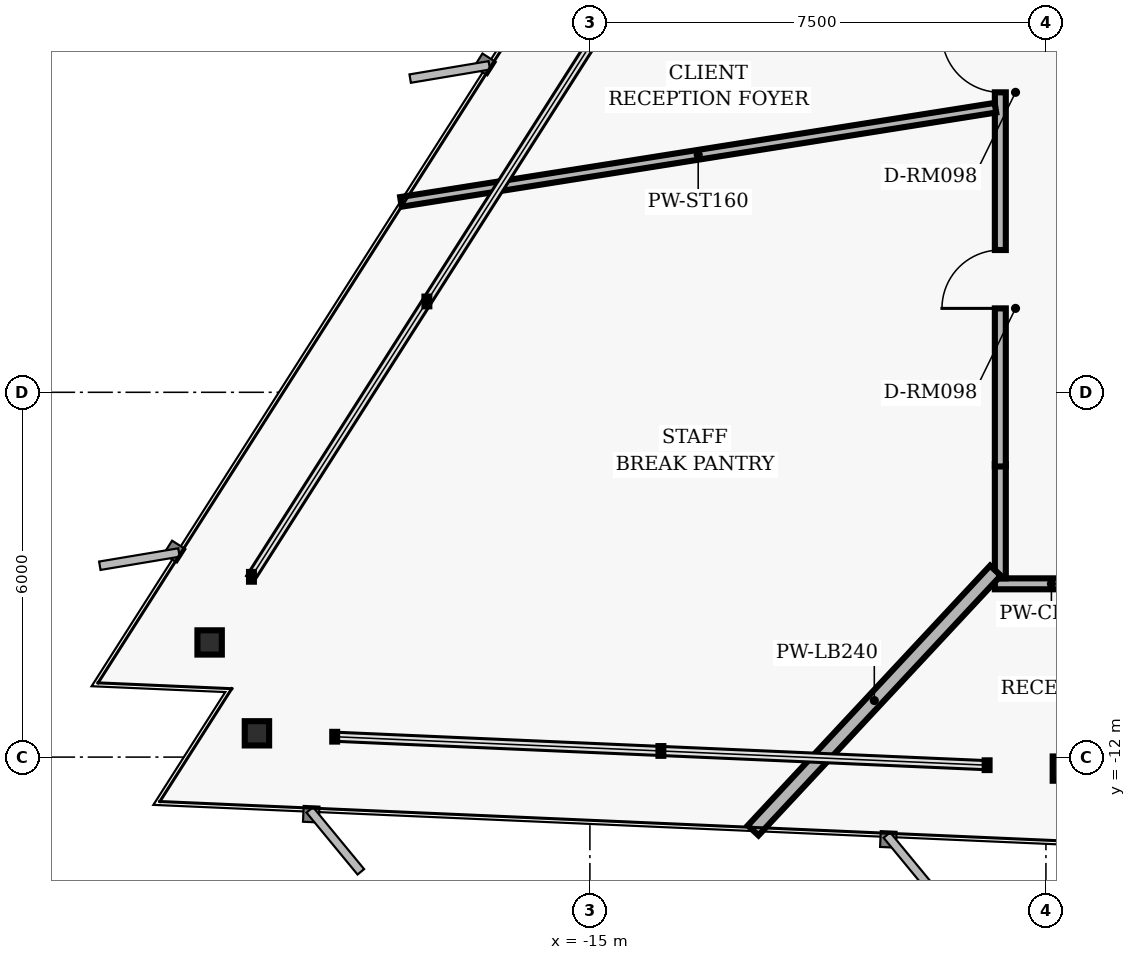
"""IFC4 building model, lengths in metres.
Left out: names, types, materials, properties, quantities, classifications, styles, units other than length and angle.
Written with IfcOpenShell. Run it as: python <this file> out.ifc"""

import sys

from ifc_helpers import new_model, si_unit, direction, frame, frame_2d, origin, origin_2d, place, context, subcontext, project, spatial, rectangle, i_section, extrude, element, fill, save


model = new_model("IFC4")
c1 = context("Model", 3, precision=1e-05, world=origin(), true_north=direction((0.0, 1.0)))
c2 = subcontext(c1, "Body", "Model", "MODEL_VIEW")
j1 = project(units=[si_unit("LENGTHUNIT", "METRE"), si_unit("PLANEANGLEUNIT", "RADIAN")], contexts=[c1])
p1 = place(None, origin())
s1 = spatial("IfcSite", under=j1, at=p1, CompositionType="ELEMENT")
p2 = place(p1, origin())
s2 = spatial("IfcBuilding", under=s1, at=p2, CompositionType="ELEMENT")
p3 = place(p2, frame((0.0, 0.0, 144.16)))
s3 = spatial("IfcBuildingStorey", under=s2, at=p3, CompositionType="ELEMENT", Elevation=144.16)
for number, where, z_axis, x_axis in (
    (1, (-21.254, -10.114, 0.0), (0.0, 0.0, 1.0), (1.0, 0.0, 0.0)),
    (2, (-20.476, -11.609, 0.0), (0.0, 0.0, 1.0), (1.0, 0.0, 0.0)),
    (3, (-7.188, -12.189, 0.0), (0.0, 0.0, 1.0), (1.0, 0.0, 0.0)),
):
    element("IfcColumn", number, at=place(p3, frame(where, z_axis=z_axis, x_axis=x_axis)), inside=s3, PredefinedType="COLUMN", context=c2, shape_type="SweptSolid", body=[
        extrude(i_section(OverallWidth=0.401, OverallDepth=0.399, WebThickness=0.025, FlangeThickness=0.04, FilletRadius=0.018, at=origin_2d()), origin(), (0.0, 0.0, 1.0), 3.04),
    ])
p4 = place(p3, frame((-6.48, -9.15, 0.0), z_axis=(0.0, 0.0, 1.0), x_axis=(-1.0, 0.0, 0.0)))
e4 = element("IfcWall", 4, at=p4, inside=s3, PredefinedType="PARTITIONING", context=c2, shape_type="SweptSolid", body=[
    extrude(rectangle(XDim=1.86, YDim=0.18, at=frame_2d((0.93, 0.0))), origin(), (0.0, 0.0, 1.0), 2.16),
])
p5 = place(p3, frame((-8.25, -9.06, 0.0), z_axis=(0.0, 0.0, 1.0), x_axis=(0.0, 1.0, 0.0)))
e5 = element("IfcWall", 5, at=p5, inside=s3, PredefinedType="PARTITIONING", context=c2, shape_type="SweptSolid", body=[
    extrude(rectangle(XDim=1.88, YDim=0.18, at=frame_2d((0.94, 0.0))), origin(), (0.0, 0.0, 1.0), 2.593),
])
p6 = place(p3, frame((-8.25, -7.22, 0.0), z_axis=(0.0, 0.0, 1.0), x_axis=(0.0, 1.0, 0.0)))
e6 = element("IfcWall", 6, at=p6, inside=s3, PredefinedType="PARTITIONING", context=c2, shape_type="SweptSolid", body=[
    extrude(rectangle(XDim=14.44, YDim=0.18, at=frame_2d((7.22, 0.0))), origin(), (0.0, 0.0, 1.0), 2.593),
])
p7 = place(p6, frame((6.154, 0.0, 0.0)))
e7 = element("IfcOpeningElement", 7, at=p7, cuts=e6, PredefinedType="OPENING", context=c2, shape_type="SweptSolid", body=[
    extrude(rectangle(XDim=0.96, YDim=2.02, at=frame_2d((0.48, 1.01))), frame((0.0, 0.1, 0.0), z_axis=(0.0, -1.0, 0.0), x_axis=(1.0, 0.0, 0.0)), (0.0, 0.0, 1.0), 0.2),
])
p8 = place(p6, frame((2.6, 0.0, 0.0)))
e8 = element("IfcOpeningElement", 8, at=p8, cuts=e6, PredefinedType="OPENING", context=c2, shape_type="SweptSolid", body=[
    extrude(rectangle(XDim=0.96, YDim=2.02, at=frame_2d((0.48, 1.01))), frame((0.0, 0.1, 0.0), z_axis=(0.0, -1.0, 0.0), x_axis=(1.0, 0.0, 0.0)), (0.0, 0.0, 1.0), 0.2),
])
p9 = place(p6, frame((12.347, 0.0, 0.0)))
e9 = element("IfcOpeningElement", 9, at=p9, cuts=e6, PredefinedType="OPENING", context=c2, shape_type="SweptSolid", body=[
    extrude(rectangle(XDim=0.96, YDim=2.02, at=frame_2d((0.48, 1.01))), frame((0.0, 0.1, 0.0), z_axis=(0.0, -1.0, 0.0), x_axis=(1.0, 0.0, 0.0)), (0.0, 0.0, 1.0), 0.2),
])
p10 = place(p6, frame((8.936, 0.0, 0.0)))
e10 = element("IfcOpeningElement", 10, at=p10, cuts=e6, PredefinedType="OPENING", context=c2, shape_type="SweptSolid", body=[
    extrude(rectangle(XDim=0.96, YDim=2.02, at=frame_2d((0.48, 1.01))), frame((0.0, 0.1, 0.0), z_axis=(0.0, -1.0, 0.0), x_axis=(1.0, 0.0, 0.0)), (0.0, 0.0, 1.0), 0.2),
])
p11 = place(p3, frame((-8.33, -1.319, 0.0), z_axis=(0.0, 0.0, 1.0), x_axis=(-0.987688868154, -0.156431134128, 0.0)))
e11 = element("IfcWall", 11, at=p11, inside=s3, PredefinedType="PARTITIONING", context=c2, shape_type="SweptSolid", body=[
    extrude(rectangle(XDim=9.899, YDim=0.16, at=frame_2d((4.95, 0.0))), origin(), (0.0, 0.0, 1.0), 2.593),
])
p12 = place(p3, frame((-8.33, -8.933, 0.0), z_axis=(0.0, 0.0, 1.0), x_axis=(-0.682004079658, -0.731348367968, 0.0)))
e12 = element("IfcWall", 12, at=p12, inside=s3, PredefinedType="PARTITIONING", context=c2, shape_type="SweptSolid", body=[
    extrude(rectangle(XDim=5.843, YDim=0.24, at=frame_2d((2.922, 0.0))), origin(), (0.0, 0.0, 1.0), 2.593),
])
p13 = place(p7, origin())
e13 = element("IfcDoor", 13, at=p13, inside=s3, OperationType="SINGLE_SWING_RIGHT", PredefinedType="DOOR", context=c2, shape_type="SweptSolid", body=[
    extrude(rectangle(XDim=0.96, YDim=2.02, at=frame_2d((0.48, 1.01))), frame((0.0, 0.025, 0.0), z_axis=(0.0, -1.0, 0.0), x_axis=(1.0, 0.0, 0.0)), (0.0, 0.0, 1.0), 0.05),
])
fill(e7, e13)
p14 = place(p8, origin())
e14 = element("IfcDoor", 14, at=p14, inside=s3, OperationType="SINGLE_SWING_LEFT", PredefinedType="DOOR", context=c2, shape_type="SweptSolid", body=[
    extrude(rectangle(XDim=0.96, YDim=2.02, at=frame_2d((0.48, 1.01))), frame((0.0, 0.025, 0.0), z_axis=(0.0, -1.0, 0.0), x_axis=(1.0, 0.0, 0.0)), (0.0, 0.0, 1.0), 0.05),
])
fill(e8, e14)
save(model, sys.argv[1])
